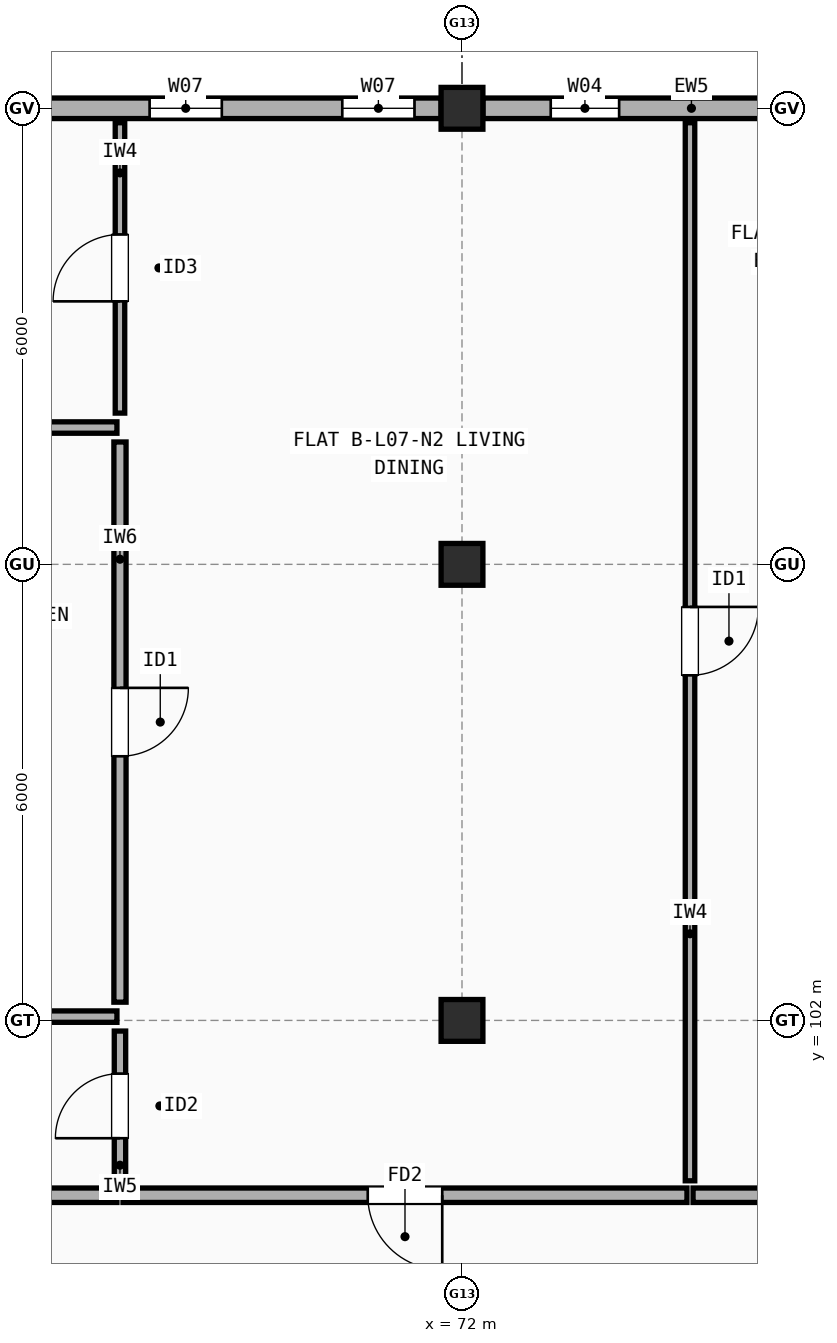
"""IFC4 building model, lengths in metres.
Left out: names, types, materials, properties, quantities, classifications, styles, units other than length and angle.
Written with IfcOpenShell. Run it as: python <this file> out.ifc"""

import sys

from ifc_helpers import new_model, si_unit, direction, frame, frame_2d, origin, origin_2d, place, context, subcontext, project, spatial, rectangle, extrude, element, fill, save


model = new_model("IFC4")
c1 = context("Model", 3, precision=1e-05, world=origin(), true_north=direction((0.0, 1.0)))
c2 = subcontext(c1, "Body", "Model", "MODEL_VIEW")
j1 = project(units=[si_unit("LENGTHUNIT", "METRE"), si_unit("PLANEANGLEUNIT", "RADIAN")], contexts=[c1])
p1 = place(None, origin())
s1 = spatial("IfcSite", under=j1, at=p1, CompositionType="ELEMENT")
p2 = place(p1, origin())
s2 = spatial("IfcBuilding", under=s1, at=p2, CompositionType="ELEMENT")
p3 = place(p2, frame((0.0, 0.0, 23.7)))
s3 = spatial("IfcBuildingStorey", under=s2, at=p3, CompositionType="ELEMENT", Elevation=23.7)
for number, where, z_axis, x_axis in (
    (1, (72.0, 102.0, 0.0), (0.0, 0.0, 1.0), (1.0, 0.0, 0.0)),
    (2, (72.0, 108.0, 0.0), (0.0, 0.0, 1.0), (1.0, 0.0, 0.0)),
    (3, (72.0, 114.0, 0.0), (0.0, 0.0, 1.0), (1.0, 0.0, 0.0)),
):
    element("IfcColumn", number, at=place(p3, frame(where, z_axis=z_axis, x_axis=x_axis)), inside=s3, PredefinedType="COLUMN", context=c2, shape_type="SweptSolid", body=[
        extrude(rectangle(XDim=0.55, YDim=0.55, at=origin_2d()), origin(), (0.0, 0.0, 1.0), 2.975),
    ])
p4 = place(p3, frame((77.75, 114.0, 0.0), z_axis=(0.0, 0.0, 1.0), x_axis=(-1.0, 0.0, 0.0)))
e4 = element("IfcWall", 4, at=p4, inside=s3, PredefinedType="STANDARD", context=c2, shape_type="SweptSolid", body=[
    extrude(rectangle(XDim=5.475, YDim=0.27, at=frame_2d((2.738, 0.0))), origin(), (0.0, 0.0, 1.0), 2.457),
])
p5 = place(p4, frame((0.93, 0.0, 0.9)))
e5 = element("IfcOpeningElement", 5, at=p5, cuts=e4, PredefinedType="OPENING", context=c2, shape_type="SweptSolid", body=[
    extrude(rectangle(XDim=0.85, YDim=1.25, at=frame_2d((0.425, 0.625))), frame((0.0, 0.145, 0.0), z_axis=(0.0, -1.0, 0.0), x_axis=(1.0, 0.0, 0.0)), (0.0, 0.0, 1.0), 0.29),
])
p6 = place(p4, frame((3.683, 0.0, 0.9)))
e6 = element("IfcOpeningElement", 6, at=p6, cuts=e4, PredefinedType="OPENING", context=c2, shape_type="SweptSolid", body=[
    extrude(rectangle(XDim=0.9, YDim=1.3, at=frame_2d((0.45, 0.65))), frame((0.0, 0.145, 0.0), z_axis=(0.0, -1.0, 0.0), x_axis=(1.0, 0.0, 0.0)), (0.0, 0.0, 1.0), 0.29),
])
p7 = place(p3, frame((71.725, 114.0, 0.0), z_axis=(0.0, 0.0, 1.0), x_axis=(-1.0, 0.0, 0.0)))
e7 = element("IfcWall", 7, at=p7, inside=s3, PredefinedType="STANDARD", context=c2, shape_type="SweptSolid", body=[
    extrude(rectangle(XDim=5.45, YDim=0.27, at=frame_2d((2.725, 0.0))), origin(), (0.0, 0.0, 1.0), 2.457),
])
p8 = place(p7, frame((0.35, 0.0, 0.9)))
e8 = element("IfcOpeningElement", 8, at=p8, cuts=e7, PredefinedType="OPENING", context=c2, shape_type="SweptSolid", body=[
    extrude(rectangle(XDim=0.95, YDim=1.35, at=frame_2d((0.475, 0.675))), frame((0.0, 0.145, 0.0), z_axis=(0.0, -1.0, 0.0), x_axis=(1.0, 0.0, 0.0)), (0.0, 0.0, 1.0), 0.29),
])
p9 = place(p7, frame((2.885, 0.0, 0.9)))
e9 = element("IfcOpeningElement", 9, at=p9, cuts=e7, PredefinedType="OPENING", context=c2, shape_type="SweptSolid", body=[
    extrude(rectangle(XDim=0.95, YDim=1.35, at=frame_2d((0.475, 0.675))), frame((0.0, 0.145, 0.0), z_axis=(0.0, -1.0, 0.0), x_axis=(1.0, 0.0, 0.0)), (0.0, 0.0, 1.0), 0.29),
])
p10 = place(p3, frame((63.04, 99.7, 0.0), z_axis=(0.0, 0.0, 1.0), x_axis=(1.0, 0.0, 0.0)))
e10 = element("IfcWall", 10, at=p10, inside=s3, PredefinedType="SOLIDWALL", context=c2, shape_type="SweptSolid", body=[
    extrude(rectangle(XDim=4.42, YDim=0.19, at=frame_2d((2.21, 0.0))), origin(), (0.0, 0.0, 1.0), 2.975),
])
p11 = place(p3, frame((67.54, 99.7, 0.0), z_axis=(0.0, 0.0, 1.0), x_axis=(1.0, 0.0, 0.0)))
e11 = element("IfcWall", 11, at=p11, inside=s3, PredefinedType="SOLIDWALL", context=c2, shape_type="SweptSolid", body=[
    extrude(rectangle(XDim=7.42, YDim=0.19, at=frame_2d((3.71, 0.0))), origin(), (0.0, 0.0, 1.0), 2.975),
])
p12 = place(p11, frame((3.22, 0.0, 0.0)))
e12 = element("IfcOpeningElement", 12, at=p12, cuts=e11, PredefinedType="OPENING", context=c2, shape_type="SweptSolid", body=[
    extrude(rectangle(XDim=0.98, YDim=2.15, at=frame_2d((0.49, 1.075))), frame((0.0, 0.105, 0.0), z_axis=(0.0, -1.0, 0.0), x_axis=(1.0, 0.0, 0.0)), (0.0, 0.0, 1.0), 0.21),
])
p13 = place(p3, frame((67.5, 109.99, 0.0), z_axis=(0.0, 0.0, 1.0), x_axis=(0.0, 1.0, 0.0)))
e13 = element("IfcWall", 13, at=p13, inside=s3, PredefinedType="PARTITIONING", context=c2, shape_type="SweptSolid", body=[
    extrude(rectangle(XDim=3.82, YDim=0.125, at=frame_2d((1.91, 0.0))), origin(), (0.0, 0.0, 1.0), 2.975),
])
p14 = place(p13, frame((1.47, 0.0, 0.0)))
e14 = element("IfcOpeningElement", 14, at=p14, cuts=e13, PredefinedType="OPENING", context=c2, shape_type="SweptSolid", body=[
    extrude(rectangle(XDim=0.88, YDim=2.1, at=frame_2d((0.44, 1.05))), frame((0.0, 0.073, 0.0), z_axis=(0.0, -1.0, 0.0), x_axis=(1.0, 0.0, 0.0)), (0.0, 0.0, 1.0), 0.145),
])
p15 = place(p3, frame((67.5, 102.24, 0.0), z_axis=(0.0, 0.0, 1.0), x_axis=(0.0, 1.0, 0.0)))
e15 = element("IfcWall", 15, at=p15, inside=s3, PredefinedType="PLUMBINGWALL", context=c2, shape_type="SweptSolid", body=[
    extrude(rectangle(XDim=7.37, YDim=0.16, at=frame_2d((3.685, 0.0))), origin(), (0.0, 0.0, 1.0), 2.457),
])
p16 = place(p15, frame((3.235, 0.0, 0.0)))
e16 = element("IfcOpeningElement", 16, at=p16, cuts=e15, PredefinedType="OPENING", context=c2, shape_type="SweptSolid", body=[
    extrude(rectangle(XDim=0.9, YDim=2.1, at=frame_2d((0.45, 1.05))), frame((0.0, 0.09, 0.0), z_axis=(0.0, -1.0, 0.0), x_axis=(1.0, 0.0, 0.0)), (0.0, 0.0, 1.0), 0.18),
])
p17 = place(p3, frame((67.5, 99.89, 0.0), z_axis=(0.0, 0.0, 1.0), x_axis=(0.0, 1.0, 0.0)))
e17 = element("IfcWall", 17, at=p17, inside=s3, PredefinedType="PARTITIONING", context=c2, shape_type="SweptSolid", body=[
    extrude(rectangle(XDim=1.97, YDim=0.15, at=frame_2d((0.985, 0.0))), origin(), (0.0, 0.0, 1.0), 2.975),
])
p18 = place(p17, frame((0.56, 0.0, 0.0)))
e18 = element("IfcOpeningElement", 18, at=p18, cuts=e17, PredefinedType="OPENING", context=c2, shape_type="SweptSolid", body=[
    extrude(rectangle(XDim=0.85, YDim=2.1, at=frame_2d((0.425, 1.05))), frame((0.0, 0.085, 0.0), z_axis=(0.0, -1.0, 0.0), x_axis=(1.0, 0.0, 0.0)), (0.0, 0.0, 1.0), 0.17),
])
p19 = place(p3, frame((63.04, 109.8, 0.0), z_axis=(0.0, 0.0, 1.0), x_axis=(1.0, 0.0, 0.0)))
e19 = element("IfcWall", 19, at=p19, inside=s3, PredefinedType="PARTITIONING", context=c2, shape_type="SweptSolid", body=[
    extrude(rectangle(XDim=4.42, YDim=0.15, at=frame_2d((2.21, 0.0))), origin(), (0.0, 0.0, 1.0), 2.458),
])
p20 = place(p3, frame((63.04, 102.05, 0.0), z_axis=(0.0, 0.0, 1.0), x_axis=(1.0, 0.0, 0.0)))
e20 = element("IfcWall", 20, at=p20, inside=s3, PredefinedType="PARTITIONING", context=c2, shape_type="SweptSolid", body=[
    extrude(rectangle(XDim=4.42, YDim=0.15, at=frame_2d((2.21, 0.0))), origin(), (0.0, 0.0, 1.0), 2.457),
])
p21 = place(p3, frame((75.04, 99.7, 0.0), z_axis=(0.0, 0.0, 1.0), x_axis=(1.0, 0.0, 0.0)))
e21 = element("IfcWall", 21, at=p21, inside=s3, PredefinedType="SOLIDWALL", context=c2, shape_type="SweptSolid", body=[
    extrude(rectangle(XDim=2.92, YDim=0.19, at=frame_2d((1.46, 0.0))), origin(), (0.0, 0.0, 1.0), 2.457),
])
p22 = place(p3, frame((75.0, 99.89, 0.0), z_axis=(0.0, 0.0, 1.0), x_axis=(0.0, 1.0, 0.0)))
e22 = element("IfcWall", 22, at=p22, inside=s3, PredefinedType="PARTITIONING", context=c2, shape_type="SweptSolid", body=[
    extrude(rectangle(XDim=13.92, YDim=0.125, at=frame_2d((6.96, 0.0))), origin(), (0.0, 0.0, 1.0), 2.457),
])
p23 = place(p22, frame((6.65, 0.0, 0.0)))
e23 = element("IfcOpeningElement", 23, at=p23, cuts=e22, PredefinedType="OPENING", context=c2, shape_type="SweptSolid", body=[
    extrude(rectangle(XDim=0.9, YDim=2.1, at=frame_2d((0.45, 1.05))), frame((0.0, 0.073, 0.0), z_axis=(0.0, -1.0, 0.0), x_axis=(1.0, 0.0, 0.0)), (0.0, 0.0, 1.0), 0.145),
])
p24 = place(p6, origin())
e24 = element("IfcWindow", 24, at=p24, inside=s3, PartitioningType="SINGLE_PANEL", PredefinedType="WINDOW", context=c2, shape_type="SweptSolid", body=[
    extrude(rectangle(XDim=0.9, YDim=1.3, at=frame_2d((0.45, 0.65))), frame((0.0, 0.03, 0.0), z_axis=(0.0, -1.0, 0.0), x_axis=(1.0, 0.0, 0.0)), (0.0, 0.0, 1.0), 0.06),
])
fill(e6, e24)
p25 = place(p8, origin())
e25 = element("IfcWindow", 25, at=p25, inside=s3, PartitioningType="SINGLE_PANEL", PredefinedType="WINDOW", context=c2, shape_type="SweptSolid", body=[
    extrude(rectangle(XDim=0.95, YDim=1.35, at=frame_2d((0.475, 0.675))), frame((0.0, 0.03, 0.0), z_axis=(0.0, -1.0, 0.0), x_axis=(1.0, 0.0, 0.0)), (0.0, 0.0, 1.0), 0.06),
])
fill(e8, e25)
p26 = place(p9, origin())
e26 = element("IfcWindow", 26, at=p26, inside=s3, PartitioningType="SINGLE_PANEL", PredefinedType="WINDOW", context=c2, shape_type="SweptSolid", body=[
    extrude(rectangle(XDim=0.95, YDim=1.35, at=frame_2d((0.475, 0.675))), frame((0.0, 0.03, 0.0), z_axis=(0.0, -1.0, 0.0), x_axis=(1.0, 0.0, 0.0)), (0.0, 0.0, 1.0), 0.06),
])
fill(e9, e26)
p27 = place(p12, origin())
e27 = element("IfcDoor", 27, at=p27, inside=s3, OperationType="SINGLE_SWING_RIGHT", PredefinedType="DOOR", context=c2, shape_type="SweptSolid", body=[
    extrude(rectangle(XDim=0.98, YDim=2.15, at=frame_2d((0.49, 1.075))), frame((0.0, 0.025, 0.0), z_axis=(0.0, -1.0, 0.0), x_axis=(1.0, 0.0, 0.0)), (0.0, 0.0, 1.0), 0.05),
])
fill(e12, e27)
p28 = place(p14, origin())
e28 = element("IfcDoor", 28, at=p28, inside=s3, OperationType="SINGLE_SWING_LEFT", PredefinedType="DOOR", context=c2, shape_type="SweptSolid", body=[
    extrude(rectangle(XDim=0.88, YDim=2.1, at=frame_2d((0.44, 1.05))), frame((0.0, 0.025, 0.0), z_axis=(0.0, -1.0, 0.0), x_axis=(1.0, 0.0, 0.0)), (0.0, 0.0, 1.0), 0.05),
])
fill(e14, e28)
p29 = place(p16, origin())
e29 = element("IfcDoor", 29, at=p29, inside=s3, OperationType="SINGLE_SWING_RIGHT", PredefinedType="DOOR", context=c2, shape_type="SweptSolid", body=[
    extrude(rectangle(XDim=0.9, YDim=2.1, at=frame_2d((0.45, 1.05))), frame((0.0, 0.025, 0.0), z_axis=(0.0, -1.0, 0.0), x_axis=(1.0, 0.0, 0.0)), (0.0, 0.0, 1.0), 0.05),
])
fill(e16, e29)
p30 = place(p18, origin())
e30 = element("IfcDoor", 30, at=p30, inside=s3, OperationType="SINGLE_SWING_LEFT", PredefinedType="DOOR", context=c2, shape_type="SweptSolid", body=[
    extrude(rectangle(XDim=0.85, YDim=2.1, at=frame_2d((0.425, 1.05))), frame((0.0, 0.025, 0.0), z_axis=(0.0, -1.0, 0.0), x_axis=(1.0, 0.0, 0.0)), (0.0, 0.0, 1.0), 0.05),
])
fill(e18, e30)
p31 = place(p23, origin())
e31 = element("IfcDoor", 31, at=p31, inside=s3, OperationType="SINGLE_SWING_RIGHT", PredefinedType="DOOR", context=c2, shape_type="SweptSolid", body=[
    extrude(rectangle(XDim=0.9, YDim=2.1, at=frame_2d((0.45, 1.05))), frame((0.0, 0.025, 0.0), z_axis=(0.0, -1.0, 0.0), x_axis=(1.0, 0.0, 0.0)), (0.0, 0.0, 1.0), 0.05),
])
fill(e23, e31)
save(model, sys.argv[1])
